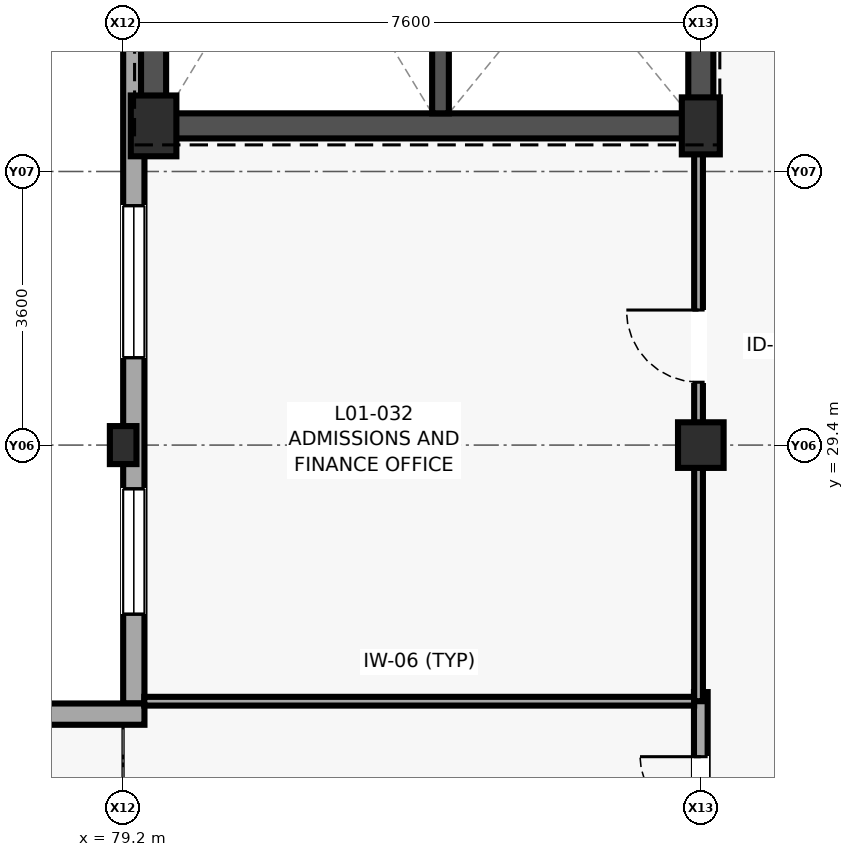
"""IFC4 building model, lengths in metres.
Left out: names, types, materials, properties, quantities, classifications, styles, units other than length and angle.
Written with IfcOpenShell. Run it as: python <this file> out.ifc"""

import sys

from ifc_helpers import new_model, si_unit, direction, frame, frame_2d, origin, origin_2d, place, context, subcontext, project, spatial, rectangle, extrude, element, fill, save


model = new_model("IFC4")
c1 = context("Model", 3, precision=1e-05, world=origin(), true_north=direction((0.0, 1.0)))
c2 = subcontext(c1, "Body", "Model", "MODEL_VIEW")
j1 = project(units=[si_unit("LENGTHUNIT", "METRE"), si_unit("PLANEANGLEUNIT", "RADIAN")], contexts=[c1])
p1 = place(None, origin())
s1 = spatial("IfcSite", under=j1, at=p1, CompositionType="ELEMENT")
p2 = place(p1, origin())
s2 = spatial("IfcBuilding", under=s1, at=p2, CompositionType="ELEMENT")
p3 = place(p2, frame((0.0, 0.0, 4.2)))
s3 = spatial("IfcBuildingStorey", under=s2, at=p3, CompositionType="ELEMENT", Elevation=4.2)
p4 = place(p3, frame((79.2, 29.4, 0.0), z_axis=(0.0, 0.0, 1.0), x_axis=(1.0, 0.0, 0.0)))
e1 = element("IfcColumn", 1, at=p4, inside=s3, PredefinedType="PILASTER", context=c2, shape_type="SweptSolid", body=[
    extrude(rectangle(XDim=0.35, YDim=0.5, at=origin_2d()), origin(), (0.0, 0.0, 1.0), 4.0),
])
p5 = place(p3, frame((79.6, 33.6, 0.0), z_axis=(0.0, 0.0, 1.0), x_axis=(1.0, 0.0, 0.0)))
e2 = element("IfcColumn", 2, at=p5, inside=s3, PredefinedType="COLUMN", context=c2, shape_type="SweptSolid", body=[
    extrude(rectangle(XDim=0.6, YDim=0.8, at=origin_2d()), origin(), (0.0, 0.0, 1.0), 4.0),
])
p6 = place(p3, frame((86.8, 29.4, 0.0), z_axis=(0.0, 0.0, 1.0), x_axis=(1.0, 0.0, 0.0)))
e3 = element("IfcColumn", 3, at=p6, inside=s3, PredefinedType="COLUMN", context=c2, shape_type="SweptSolid", body=[
    extrude(rectangle(XDim=0.6, YDim=0.6, at=origin_2d()), origin(), (0.0, 0.0, 1.0), 4.0),
])
p7 = place(p3, frame((86.8, 33.6, 0.0), z_axis=(0.0, 0.0, 1.0), x_axis=(1.0, 0.0, 0.0)))
e4 = element("IfcColumn", 4, at=p7, inside=s3, PredefinedType="COLUMN", context=c2, shape_type="SweptSolid", body=[
    extrude(rectangle(XDim=0.5, YDim=0.75, at=origin_2d()), origin(), (0.0, 0.0, 1.0), 4.0),
])
p8 = place(p3, frame((79.34, 42.0, 0.0), z_axis=(0.0, 0.0, 1.0), x_axis=(0.0, -1.0, 0.0)))
e5 = element("IfcWall", 5, at=p8, inside=s3, PredefinedType="SOLIDWALL", context=c2, shape_type="SweptSolid", body=[
    extrude(rectangle(XDim=16.0, YDim=0.28, at=frame_2d((8.0, 0.0))), origin(), (0.0, 0.0, 1.0), 3.175),
])
p9 = place(p8, frame((9.45, 0.0, 0.75)))
e6 = element("IfcOpeningElement", 6, at=p9, cuts=e5, PredefinedType="OPENING", context=c2, shape_type="SweptSolid", body=[
    extrude(rectangle(XDim=2.0, YDim=2.1, at=frame_2d((1.0, 1.05))), frame((0.0, 0.15, 0.0), z_axis=(0.0, -1.0, 0.0), x_axis=(1.0, 0.0, 0.0)), (0.0, 0.0, 1.0), 0.3),
])
p10 = place(p8, frame((13.175, 0.0, 0.85)))
e7 = element("IfcOpeningElement", 7, at=p10, cuts=e5, PredefinedType="OPENING", context=c2, shape_type="SweptSolid", body=[
    extrude(rectangle(XDim=1.65, YDim=1.95, at=frame_2d((0.825, 0.975))), frame((0.0, 0.15, 0.0), z_axis=(0.0, -1.0, 0.0), x_axis=(1.0, 0.0, 0.0)), (0.0, 0.0, 1.0), 0.3),
])
p11 = place(p3, frame((79.48, 25.86, 0.0), z_axis=(0.0, 0.0, 1.0), x_axis=(-1.0, 0.0, 0.0)))
e8 = element("IfcWall", 8, at=p11, inside=s3, PredefinedType="SOLIDWALL", context=c2, shape_type="SweptSolid", body=[
    extrude(rectangle(XDim=13.419, YDim=0.28, at=frame_2d((6.709, 0.0))), origin(), (0.0, 0.0, 1.0), 3.78),
])
p12 = place(p11, frame((1.686, 0.0, 0.75)))
e9 = element("IfcOpeningElement", 9, at=p12, cuts=e8, PredefinedType="OPENING", context=c2, shape_type="SweptSolid", body=[
    extrude(rectangle(XDim=1.1, YDim=2.1, at=frame_2d((0.55, 1.05))), frame((0.0, 0.15, 0.0), z_axis=(0.0, -1.0, 0.0), x_axis=(1.0, 0.0, 0.0)), (0.0, 0.0, 1.0), 0.3),
])
p13 = place(p11, frame((5.934, 0.0, 0.85)))
e10 = element("IfcOpeningElement", 10, at=p13, cuts=e8, PredefinedType="OPENING", context=c2, shape_type="SweptSolid", body=[
    extrude(rectangle(XDim=1.55, YDim=1.85, at=frame_2d((0.775, 0.925))), frame((0.0, 0.15, 0.0), z_axis=(0.0, -1.0, 0.0), x_axis=(1.0, 0.0, 0.0)), (0.0, 0.0, 1.0), 0.3),
])
p14 = place(p11, frame((10.307, 0.0, 0.75)))
e11 = element("IfcOpeningElement", 11, at=p14, cuts=e8, PredefinedType="OPENING", context=c2, shape_type="SweptSolid", body=[
    extrude(rectangle(XDim=1.75, YDim=2.05, at=frame_2d((0.875, 1.025))), frame((0.0, 0.15, 0.0), z_axis=(0.0, -1.0, 0.0), x_axis=(1.0, 0.0, 0.0)), (0.0, 0.0, 1.0), 0.3),
])
p15 = place(p3, frame((79.435, 33.6, 0.0), z_axis=(0.0, 0.0, 1.0), x_axis=(1.0, 0.0, 0.0)))
e12 = element("IfcWall", 12, at=p15, inside=s3, PredefinedType="SHEAR", context=c2, shape_type="SweptSolid", body=[
    extrude(rectangle(XDim=7.53, YDim=0.33, at=frame_2d((3.765, 0.0))), origin(), (0.0, 0.0, 1.0), 3.78),
])
for number, where, z_axis, x_axis in (
    (13, (79.6, 33.765, 0.0), (0.0, 0.0, 1.0), (0.0, 1.0, 0.0)),
    (14, (86.8, 33.765, 0.0), (0.0, 0.0, 1.0), (0.0, 1.0, 0.0)),
):
    element("IfcWall", number, at=place(p3, frame(where, z_axis=z_axis, x_axis=x_axis)), inside=s3, PredefinedType="SHEAR", context=c2, shape_type="SweptSolid", body=[
        extrude(rectangle(XDim=7.47, YDim=0.33, at=frame_2d((3.735, 0.0))), origin(), (0.0, 0.0, 1.0), 3.78),
    ])
p16 = place(p3, frame((83.375, 33.765, 0.0), z_axis=(0.0, 0.0, 1.0), x_axis=(0.0, 1.0, 0.0)))
e15 = element("IfcWall", 15, at=p16, inside=s3, PredefinedType="SHEAR", context=c2, shape_type="SweptSolid", body=[
    extrude(rectangle(XDim=7.47, YDim=0.22, at=frame_2d((3.735, 0.0))), origin(), (0.0, 0.0, 1.0), 3.78),
])
p17 = place(p16, frame((6.12, 0.0, 0.0)))
e16 = element("IfcOpeningElement", 16, at=p17, cuts=e15, PredefinedType="OPENING", context=c2, shape_type="SweptSolid", body=[
    extrude(rectangle(XDim=1.1, YDim=2.15, at=frame_2d((0.55, 1.075))), frame((0.0, 0.12, 0.0), z_axis=(0.0, -1.0, 0.0), x_axis=(1.0, 0.0, 0.0)), (0.0, 0.0, 1.0), 0.24),
])
p18 = place(p3, frame((86.8, 22.85, 0.0), z_axis=(0.0, 0.0, 1.0), x_axis=(0.0, 1.0, 0.0)))
e17 = element("IfcWall", 17, at=p18, inside=s3, PredefinedType="PARTITIONING", context=c2, shape_type="SweptSolid", body=[
    extrude(rectangle(XDim=3.3, YDim=0.18, at=frame_2d((1.65, 0.0))), origin(), (0.0, 0.0, 1.0), 3.175),
])
p19 = place(p18, frame((0.85, 0.0, 0.0)))
e18 = element("IfcOpeningElement", 18, at=p19, cuts=e17, PredefinedType="OPENING", context=c2, shape_type="SweptSolid", body=[
    extrude(rectangle(XDim=1.6, YDim=2.25, at=frame_2d((0.8, 1.125))), frame((0.0, 0.1, 0.0), z_axis=(0.0, -1.0, 0.0), x_axis=(1.0, 0.0, 0.0)), (0.0, 0.0, 1.0), 0.2),
])
p20 = place(p3, frame((79.478, 26.03, 0.0), z_axis=(0.0, 0.0, 1.0), x_axis=(1.0, 0.0, 0.0)))
e19 = element("IfcWall", 19, at=p20, inside=s3, PredefinedType="PARTITIONING", context=c2, shape_type="SweptSolid", body=[
    extrude(rectangle(XDim=7.234, YDim=0.115, at=frame_2d((3.617, 0.0))), origin(), (0.0, 0.0, 1.0), 3.775),
])
p21 = place(p3, frame((86.77, 26.03, 0.0), z_axis=(0.0, 0.0, 1.0), x_axis=(0.0, 1.0, 0.0)))
e20 = element("IfcWall", 20, at=p21, inside=s3, PredefinedType="PARTITIONING", context=c2, shape_type="SweptSolid", body=[
    extrude(rectangle(XDim=7.407, YDim=0.115, at=frame_2d((3.704, 0.0))), origin(), (0.0, 0.0, 1.0), 3.175),
])
p22 = place(p21, frame((4.197, 0.0, 0.0)))
e21 = element("IfcOpeningElement", 21, at=p22, cuts=e20, PredefinedType="OPENING", context=c2, shape_type="SweptSolid", body=[
    extrude(rectangle(XDim=0.95, YDim=2.05, at=frame_2d((0.475, 1.025))), frame((0.0, 0.067, 0.0), z_axis=(0.0, -1.0, 0.0), x_axis=(1.0, 0.0, 0.0)), (0.0, 0.0, 1.0), 0.135),
])
p23 = place(p9, origin())
e22 = element("IfcWindow", 22, at=p23, inside=s3, PartitioningType="SINGLE_PANEL", PredefinedType="WINDOW", context=c2, shape_type="SweptSolid", body=[
    extrude(rectangle(XDim=2.0, YDim=2.1, at=frame_2d((1.0, 1.05))), frame((0.0, 0.03, 0.0), z_axis=(0.0, -1.0, 0.0), x_axis=(1.0, 0.0, 0.0)), (0.0, 0.0, 1.0), 0.06),
])
fill(e6, e22)
p24 = place(p10, origin())
e23 = element("IfcWindow", 23, at=p24, inside=s3, PartitioningType="SINGLE_PANEL", PredefinedType="WINDOW", context=c2, shape_type="SweptSolid", body=[
    extrude(rectangle(XDim=1.65, YDim=1.95, at=frame_2d((0.825, 0.975))), frame((0.0, 0.03, 0.0), z_axis=(0.0, -1.0, 0.0), x_axis=(1.0, 0.0, 0.0)), (0.0, 0.0, 1.0), 0.06),
])
fill(e7, e23)
p25 = place(p19, origin())
e24 = element("IfcDoor", 24, at=p25, inside=s3, OperationType="DOUBLE_DOOR_SINGLE_SWING", PredefinedType="DOOR", context=c2, shape_type="SweptSolid", body=[
    extrude(rectangle(XDim=1.6, YDim=2.25, at=frame_2d((0.8, 1.125))), frame((0.0, 0.025, 0.0), z_axis=(0.0, -1.0, 0.0), x_axis=(1.0, 0.0, 0.0)), (0.0, 0.0, 1.0), 0.05),
])
fill(e18, e24)
p26 = place(p22, origin())
e25 = element("IfcDoor", 25, at=p26, inside=s3, OperationType="SINGLE_SWING_RIGHT", PredefinedType="DOOR", context=c2, shape_type="SweptSolid", body=[
    extrude(rectangle(XDim=0.95, YDim=2.05, at=frame_2d((0.475, 1.025))), frame((0.0, 0.025, 0.0), z_axis=(0.0, -1.0, 0.0), x_axis=(1.0, 0.0, 0.0)), (0.0, 0.0, 1.0), 0.05),
])
fill(e21, e25)
save(model, sys.argv[1])
